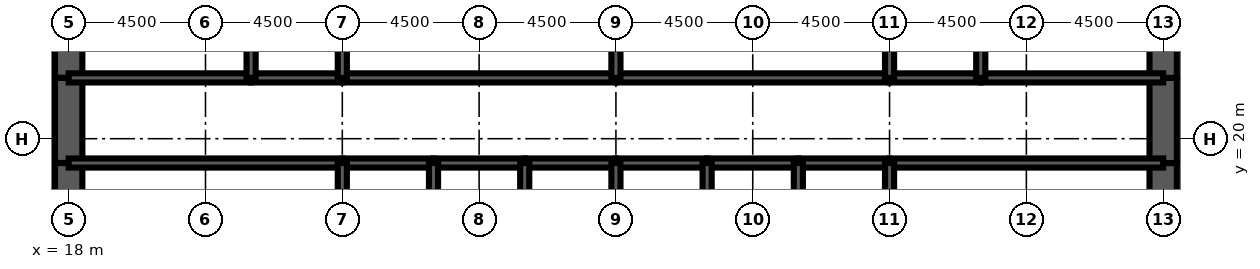
"""IFC4 building model, lengths in metres.
Left out: names, types, materials, properties, quantities, classifications, styles, units other than length and angle.
Written with IfcOpenShell. Run it as: python <this file> out.ifc"""

import sys

from ifc_helpers import new_model, si_unit, direction, frame, frame_2d, origin, place, context, subcontext, project, spatial, rectangle, extrude, element, fill, save


model = new_model("IFC4")
c1 = context("Model", 3, precision=1e-05, world=origin(), true_north=direction((0.0, 1.0)))
c2 = subcontext(c1, "Body", "Model", "MODEL_VIEW")
j1 = project(units=[si_unit("LENGTHUNIT", "METRE"), si_unit("PLANEANGLEUNIT", "RADIAN")], contexts=[c1])
p1 = place(None, origin())
s1 = spatial("IfcSite", under=j1, at=p1, CompositionType="ELEMENT")
p2 = place(p1, origin())
s2 = spatial("IfcBuilding", under=s1, at=p2, CompositionType="ELEMENT")
p3 = place(p2, frame((0.0, 0.0, 6.0)))
s3 = spatial("IfcBuildingStorey", under=s2, at=p3, CompositionType="ELEMENT", Elevation=6.0)
p4 = place(p3, frame((18.0, 26.0, 0.0), z_axis=(0.0, 0.0, 1.0), x_axis=(0.0, -1.0, 0.0)))
e1 = element("IfcWall", 1, at=p4, inside=s3, PredefinedType="SHEAR", context=c2, shape_type="SweptSolid", body=[
    extrude(rectangle(XDim=4.0, YDim=0.9, at=frame_2d((2.0, 0.0))), origin(), (0.0, 0.0, 1.0), 7.0),
])
p5 = place(p3, frame((18.0, 22.0, 0.0), z_axis=(0.0, 0.0, 1.0), x_axis=(0.0, -1.0, 0.0)))
e2 = element("IfcWall", 2, at=p5, inside=s3, PredefinedType="SHEAR", context=c2, shape_type="SweptSolid", body=[
    extrude(rectangle(XDim=2.8, YDim=0.9, at=frame_2d((1.4, 0.0))), origin(), (0.0, 0.0, 1.0), 7.0),
])
p6 = place(p5, frame((0.6, 0.0, 0.0)))
e3 = element("IfcOpeningElement", 3, at=p6, cuts=e2, PredefinedType="OPENING", context=c2, shape_type="SweptSolid", body=[
    extrude(rectangle(XDim=1.8, YDim=2.1, at=frame_2d((0.9, 1.05))), frame((0.0, 0.46, 0.0), z_axis=(0.0, -1.0, 0.0), x_axis=(1.0, 0.0, 0.0)), (0.0, 0.0, 1.0), 0.92),
])
for number, where, z_axis, x_axis in (
    (4, (18.0, 19.2, 0.0), (0.0, 0.0, 1.0), (0.0, -1.0, 0.0)),
    (5, (54.0, 16.0, 0.0), (0.0, 0.0, 1.0), (0.0, 1.0, 0.0)),
):
    element("IfcWall", number, at=place(p3, frame(where, z_axis=z_axis, x_axis=x_axis)), inside=s3, PredefinedType="SHEAR", context=c2, shape_type="SweptSolid", body=[
        extrude(rectangle(XDim=3.2, YDim=0.9, at=frame_2d((1.6, 0.0))), origin(), (0.0, 0.0, 1.0), 7.0),
    ])
p7 = place(p3, frame((54.0, 19.2, 0.0), z_axis=(0.0, 0.0, 1.0), x_axis=(0.0, 1.0, 0.0)))
e6 = element("IfcWall", 6, at=p7, inside=s3, PredefinedType="SHEAR", context=c2, shape_type="SweptSolid", body=[
    extrude(rectangle(XDim=2.8, YDim=0.9, at=frame_2d((1.4, 0.0))), origin(), (0.0, 0.0, 1.0), 7.0),
])
p8 = place(p7, frame((0.4, 0.0, 0.0)))
e7 = element("IfcOpeningElement", 7, at=p8, cuts=e6, PredefinedType="OPENING", context=c2, shape_type="SweptSolid", body=[
    extrude(rectangle(XDim=1.8, YDim=2.1, at=frame_2d((0.9, 1.05))), frame((0.0, 0.46, 0.0), z_axis=(0.0, -1.0, 0.0), x_axis=(1.0, 0.0, 0.0)), (0.0, 0.0, 1.0), 0.92),
])
p9 = place(p3, frame((54.0, 22.0, 0.0), z_axis=(0.0, 0.0, 1.0), x_axis=(0.0, 1.0, 0.0)))
e8 = element("IfcWall", 8, at=p9, inside=s3, PredefinedType="SHEAR", context=c2, shape_type="SweptSolid", body=[
    extrude(rectangle(XDim=4.0, YDim=0.9, at=frame_2d((2.0, 0.0))), origin(), (0.0, 0.0, 1.0), 7.0),
])
p10 = place(p3, frame((18.0, 19.2, 0.0), z_axis=(0.0, 0.0, 1.0), x_axis=(1.0, 0.0, 0.0)))
e9 = element("IfcWall", 9, at=p10, inside=s3, PredefinedType="SOLIDWALL", context=c2, shape_type="SweptSolid", body=[
    extrude(rectangle(XDim=9.0, YDim=0.3, at=frame_2d((4.5, 0.0))), origin(), (0.0, 0.0, 1.0), 7.0),
])
p11 = place(p10, frame((0.65, 0.0, 0.0)))
e10 = element("IfcOpeningElement", 10, at=p11, cuts=e9, PredefinedType="OPENING", context=c2, shape_type="SweptSolid", body=[
    extrude(rectangle(XDim=1.0, YDim=2.1, at=frame_2d((0.5, 1.05))), frame((0.0, 0.16, 0.0), z_axis=(0.0, -1.0, 0.0), x_axis=(1.0, 0.0, 0.0)), (0.0, 0.0, 1.0), 0.32),
])
p12 = place(p3, frame((27.0, 19.2, 0.0), z_axis=(0.0, 0.0, 1.0), x_axis=(1.0, 0.0, 0.0)))
e11 = element("IfcWall", 11, at=p12, inside=s3, PredefinedType="SOLIDWALL", context=c2, shape_type="SweptSolid", body=[
    extrude(rectangle(XDim=3.0, YDim=0.3, at=frame_2d((1.5, 0.0))), origin(), (0.0, 0.0, 1.0), 7.0),
])
p13 = place(p12, frame((0.95, 0.0, 0.0)))
e12 = element("IfcOpeningElement", 12, at=p13, cuts=e11, PredefinedType="OPENING", context=c2, shape_type="SweptSolid", body=[
    extrude(rectangle(XDim=1.1, YDim=2.2, at=frame_2d((0.55, 1.1))), frame((0.0, 0.16, 0.0), z_axis=(0.0, -1.0, 0.0), x_axis=(1.0, 0.0, 0.0)), (0.0, 0.0, 1.0), 0.32),
])
p14 = place(p3, frame((30.0, 19.2, 0.0), z_axis=(0.0, 0.0, 1.0), x_axis=(1.0, 0.0, 0.0)))
e13 = element("IfcWall", 13, at=p14, inside=s3, PredefinedType="SOLIDWALL", context=c2, shape_type="SweptSolid", body=[
    extrude(rectangle(XDim=3.0, YDim=0.3, at=frame_2d((1.5, 0.0))), origin(), (0.0, 0.0, 1.0), 7.0),
])
p15 = place(p14, frame((0.95, 0.0, 0.0)))
e14 = element("IfcOpeningElement", 14, at=p15, cuts=e13, PredefinedType="OPENING", context=c2, shape_type="SweptSolid", body=[
    extrude(rectangle(XDim=1.1, YDim=2.2, at=frame_2d((0.55, 1.1))), frame((0.0, 0.16, 0.0), z_axis=(0.0, -1.0, 0.0), x_axis=(1.0, 0.0, 0.0)), (0.0, 0.0, 1.0), 0.32),
])
p16 = place(p3, frame((33.0, 19.2, 0.0), z_axis=(0.0, 0.0, 1.0), x_axis=(1.0, 0.0, 0.0)))
e15 = element("IfcWall", 15, at=p16, inside=s3, PredefinedType="SOLIDWALL", context=c2, shape_type="SweptSolid", body=[
    extrude(rectangle(XDim=3.0, YDim=0.3, at=frame_2d((1.5, 0.0))), origin(), (0.0, 0.0, 1.0), 7.0),
])
p17 = place(p16, frame((0.95, 0.0, 0.0)))
e16 = element("IfcOpeningElement", 16, at=p17, cuts=e15, PredefinedType="OPENING", context=c2, shape_type="SweptSolid", body=[
    extrude(rectangle(XDim=1.1, YDim=2.2, at=frame_2d((0.55, 1.1))), frame((0.0, 0.16, 0.0), z_axis=(0.0, -1.0, 0.0), x_axis=(1.0, 0.0, 0.0)), (0.0, 0.0, 1.0), 0.32),
])
p18 = place(p3, frame((36.0, 19.2, 0.0), z_axis=(0.0, 0.0, 1.0), x_axis=(1.0, 0.0, 0.0)))
e17 = element("IfcWall", 17, at=p18, inside=s3, PredefinedType="SOLIDWALL", context=c2, shape_type="SweptSolid", body=[
    extrude(rectangle(XDim=3.0, YDim=0.3, at=frame_2d((1.5, 0.0))), origin(), (0.0, 0.0, 1.0), 7.0),
])
p19 = place(p18, frame((0.95, 0.0, 0.0)))
e18 = element("IfcOpeningElement", 18, at=p19, cuts=e17, PredefinedType="OPENING", context=c2, shape_type="SweptSolid", body=[
    extrude(rectangle(XDim=1.1, YDim=2.2, at=frame_2d((0.55, 1.1))), frame((0.0, 0.16, 0.0), z_axis=(0.0, -1.0, 0.0), x_axis=(1.0, 0.0, 0.0)), (0.0, 0.0, 1.0), 0.32),
])
for number, where, z_axis, x_axis in (
    (19, (39.0, 19.2, 0.0), (0.0, 0.0, 1.0), (1.0, 0.0, 0.0)),
    (20, (42.0, 19.2, 0.0), (0.0, 0.0, 1.0), (1.0, 0.0, 0.0)),
):
    element("IfcWall", number, at=place(p3, frame(where, z_axis=z_axis, x_axis=x_axis)), inside=s3, PredefinedType="SOLIDWALL", context=c2, shape_type="SweptSolid", body=[
        extrude(rectangle(XDim=3.0, YDim=0.3, at=frame_2d((1.5, 0.0))), origin(), (0.0, 0.0, 1.0), 7.0),
    ])
p20 = place(p3, frame((45.0, 19.2, 0.0), z_axis=(0.0, 0.0, 1.0), x_axis=(1.0, 0.0, 0.0)))
e21 = element("IfcWall", 21, at=p20, inside=s3, PredefinedType="SOLIDWALL", context=c2, shape_type="SweptSolid", body=[
    extrude(rectangle(XDim=9.0, YDim=0.3, at=frame_2d((4.5, 0.0))), origin(), (0.0, 0.0, 1.0), 7.0),
])
p21 = place(p20, frame((7.35, 0.0, 0.0)))
e22 = element("IfcOpeningElement", 22, at=p21, cuts=e21, PredefinedType="OPENING", context=c2, shape_type="SweptSolid", body=[
    extrude(rectangle(XDim=1.0, YDim=2.1, at=frame_2d((0.5, 1.05))), frame((0.0, 0.16, 0.0), z_axis=(0.0, -1.0, 0.0), x_axis=(1.0, 0.0, 0.0)), (0.0, 0.0, 1.0), 0.32),
])
p22 = place(p3, frame((18.0, 22.0, 0.0), z_axis=(0.0, 0.0, 1.0), x_axis=(1.0, 0.0, 0.0)))
e23 = element("IfcWall", 23, at=p22, inside=s3, PredefinedType="SOLIDWALL", context=c2, shape_type="SweptSolid", body=[
    extrude(rectangle(XDim=6.0, YDim=0.3, at=frame_2d((3.0, 0.0))), origin(), (0.0, 0.0, 1.0), 7.0),
])
p23 = place(p22, frame((4.4, 0.0, 0.0)))
e24 = element("IfcOpeningElement", 24, at=p23, cuts=e23, PredefinedType="OPENING", context=c2, shape_type="SweptSolid", body=[
    extrude(rectangle(XDim=1.0, YDim=2.1, at=frame_2d((0.5, 1.05))), frame((0.0, 0.16, 0.0), z_axis=(0.0, -1.0, 0.0), x_axis=(1.0, 0.0, 0.0)), (0.0, 0.0, 1.0), 0.32),
])
p24 = place(p22, frame((0.7, 0.0, 0.0)))
e25 = element("IfcOpeningElement", 25, at=p24, cuts=e23, PredefinedType="OPENING", context=c2, shape_type="SweptSolid", body=[
    extrude(rectangle(XDim=1.0, YDim=2.1, at=frame_2d((0.5, 1.05))), frame((0.0, 0.16, 0.0), z_axis=(0.0, -1.0, 0.0), x_axis=(1.0, 0.0, 0.0)), (0.0, 0.0, 1.0), 0.32),
])
p25 = place(p3, frame((24.0, 22.0, 0.0), z_axis=(0.0, 0.0, 1.0), x_axis=(1.0, 0.0, 0.0)))
e26 = element("IfcWall", 26, at=p25, inside=s3, PredefinedType="SOLIDWALL", context=c2, shape_type="SweptSolid", body=[
    extrude(rectangle(XDim=3.0, YDim=0.3, at=frame_2d((1.5, 0.0))), origin(), (0.0, 0.0, 1.0), 7.0),
])
p26 = place(p25, frame((1.0, 0.0, 0.0)))
e27 = element("IfcOpeningElement", 27, at=p26, cuts=e26, PredefinedType="OPENING", context=c2, shape_type="SweptSolid", body=[
    extrude(rectangle(XDim=1.0, YDim=2.1, at=frame_2d((0.5, 1.05))), frame((0.0, 0.16, 0.0), z_axis=(0.0, -1.0, 0.0), x_axis=(1.0, 0.0, 0.0)), (0.0, 0.0, 1.0), 0.32),
])
p27 = place(p3, frame((27.0, 22.0, 0.0), z_axis=(0.0, 0.0, 1.0), x_axis=(1.0, 0.0, 0.0)))
e28 = element("IfcWall", 28, at=p27, inside=s3, PredefinedType="SOLIDWALL", context=c2, shape_type="SweptSolid", body=[
    extrude(rectangle(XDim=9.0, YDim=0.3, at=frame_2d((4.5, 0.0))), origin(), (0.0, 0.0, 1.0), 7.0),
])
p28 = place(p27, frame((4.0, 0.0, 0.0)))
e29 = element("IfcOpeningElement", 29, at=p28, cuts=e28, PredefinedType="OPENING", context=c2, shape_type="SweptSolid", body=[
    extrude(rectangle(XDim=1.0, YDim=2.1, at=frame_2d((0.5, 1.05))), frame((0.0, 0.16, 0.0), z_axis=(0.0, -1.0, 0.0), x_axis=(1.0, 0.0, 0.0)), (0.0, 0.0, 1.0), 0.32),
])
p29 = place(p3, frame((36.0, 22.0, 0.0), z_axis=(0.0, 0.0, 1.0), x_axis=(1.0, 0.0, 0.0)))
e30 = element("IfcWall", 30, at=p29, inside=s3, PredefinedType="SOLIDWALL", context=c2, shape_type="SweptSolid", body=[
    extrude(rectangle(XDim=9.0, YDim=0.3, at=frame_2d((4.5, 0.0))), origin(), (0.0, 0.0, 1.0), 7.0),
])
p30 = place(p29, frame((4.0, 0.0, 0.0)))
e31 = element("IfcOpeningElement", 31, at=p30, cuts=e30, PredefinedType="OPENING", context=c2, shape_type="SweptSolid", body=[
    extrude(rectangle(XDim=1.0, YDim=2.1, at=frame_2d((0.5, 1.05))), frame((0.0, 0.16, 0.0), z_axis=(0.0, -1.0, 0.0), x_axis=(1.0, 0.0, 0.0)), (0.0, 0.0, 1.0), 0.32),
])
p31 = place(p3, frame((45.0, 22.0, 0.0), z_axis=(0.0, 0.0, 1.0), x_axis=(1.0, 0.0, 0.0)))
e32 = element("IfcWall", 32, at=p31, inside=s3, PredefinedType="SOLIDWALL", context=c2, shape_type="SweptSolid", body=[
    extrude(rectangle(XDim=3.0, YDim=0.3, at=frame_2d((1.5, 0.0))), origin(), (0.0, 0.0, 1.0), 7.0),
])
p32 = place(p31, frame((1.0, 0.0, 0.0)))
e33 = element("IfcOpeningElement", 33, at=p32, cuts=e32, PredefinedType="OPENING", context=c2, shape_type="SweptSolid", body=[
    extrude(rectangle(XDim=1.0, YDim=2.1, at=frame_2d((0.5, 1.05))), frame((0.0, 0.16, 0.0), z_axis=(0.0, -1.0, 0.0), x_axis=(1.0, 0.0, 0.0)), (0.0, 0.0, 1.0), 0.32),
])
p33 = place(p3, frame((48.0, 22.0, 0.0), z_axis=(0.0, 0.0, 1.0), x_axis=(1.0, 0.0, 0.0)))
e34 = element("IfcWall", 34, at=p33, inside=s3, PredefinedType="SOLIDWALL", context=c2, shape_type="SweptSolid", body=[
    extrude(rectangle(XDim=6.0, YDim=0.3, at=frame_2d((3.0, 0.0))), origin(), (0.0, 0.0, 1.0), 7.0),
])
p34 = place(p33, frame((2.0, 0.0, 0.0)))
e35 = element("IfcOpeningElement", 35, at=p34, cuts=e34, PredefinedType="OPENING", context=c2, shape_type="SweptSolid", body=[
    extrude(rectangle(XDim=1.0, YDim=2.1, at=frame_2d((0.5, 1.05))), frame((0.0, 0.16, 0.0), z_axis=(0.0, -1.0, 0.0), x_axis=(1.0, 0.0, 0.0)), (0.0, 0.0, 1.0), 0.32),
])
p35 = place(p33, frame((4.3, 0.0, 0.0)))
e36 = element("IfcOpeningElement", 36, at=p35, cuts=e34, PredefinedType="OPENING", context=c2, shape_type="SweptSolid", body=[
    extrude(rectangle(XDim=1.0, YDim=2.1, at=frame_2d((0.5, 1.05))), frame((0.0, 0.16, 0.0), z_axis=(0.0, -1.0, 0.0), x_axis=(1.0, 0.0, 0.0)), (0.0, 0.0, 1.0), 0.32),
])
for number, where, z_axis, x_axis in (
    (37, (27.0, 16.0, 0.0), (0.0, 0.0, 1.0), (0.0, 1.0, 0.0)),
    (38, (30.0, 16.0, 0.0), (0.0, 0.0, 1.0), (0.0, 1.0, 0.0)),
    (39, (33.0, 16.0, 0.0), (0.0, 0.0, 1.0), (0.0, 1.0, 0.0)),
    (40, (36.0, 16.0, 0.0), (0.0, 0.0, 1.0), (0.0, 1.0, 0.0)),
    (41, (39.0, 16.0, 0.0), (0.0, 0.0, 1.0), (0.0, 1.0, 0.0)),
    (42, (42.0, 16.0, 0.0), (0.0, 0.0, 1.0), (0.0, 1.0, 0.0)),
    (43, (45.0, 16.0, 0.0), (0.0, 0.0, 1.0), (0.0, 1.0, 0.0)),
):
    element("IfcWall", number, at=place(p3, frame(where, z_axis=z_axis, x_axis=x_axis)), inside=s3, PredefinedType="SOLIDWALL", context=c2, shape_type="SweptSolid", body=[
        extrude(rectangle(XDim=3.2, YDim=0.3, at=frame_2d((1.6, 0.0))), origin(), (0.0, 0.0, 1.0), 7.0),
    ])
for number, where, z_axis, x_axis in (
    (44, (24.0, 22.0, 0.0), (0.0, 0.0, 1.0), (0.0, 1.0, 0.0)),
    (45, (27.0, 22.0, 0.0), (0.0, 0.0, 1.0), (0.0, 1.0, 0.0)),
    (46, (36.0, 22.0, 0.0), (0.0, 0.0, 1.0), (0.0, 1.0, 0.0)),
    (47, (45.0, 22.0, 0.0), (0.0, 0.0, 1.0), (0.0, 1.0, 0.0)),
    (48, (48.0, 22.0, 0.0), (0.0, 0.0, 1.0), (0.0, 1.0, 0.0)),
):
    element("IfcWall", number, at=place(p3, frame(where, z_axis=z_axis, x_axis=x_axis)), inside=s3, PredefinedType="SOLIDWALL", context=c2, shape_type="SweptSolid", body=[
        extrude(rectangle(XDim=4.0, YDim=0.3, at=frame_2d((2.0, 0.0))), origin(), (0.0, 0.0, 1.0), 7.0),
    ])
p36 = place(p3, frame((38.5, 22.15, 0.0), z_axis=(0.0, 0.0, 1.0), x_axis=(0.0, 1.0, 0.0)))
e49 = element("IfcWall", 49, at=p36, inside=s3, PredefinedType="PARTITIONING", context=c2, shape_type="SweptSolid", body=[
    extrude(rectangle(XDim=3.7, YDim=0.15, at=frame_2d((1.85, 0.0))), origin(), (0.0, 0.0, 1.0), 3.0),
])
p37 = place(p36, frame((2.2, 0.0, 0.0)))
e50 = element("IfcOpeningElement", 50, at=p37, cuts=e49, PredefinedType="OPENING", context=c2, shape_type="SweptSolid", body=[
    extrude(rectangle(XDim=1.0, YDim=2.1, at=frame_2d((0.5, 1.05))), frame((0.0, 0.085, 0.0), z_axis=(0.0, -1.0, 0.0), x_axis=(1.0, 0.0, 0.0)), (0.0, 0.0, 1.0), 0.17),
])
for number, where, z_axis, x_axis in (
    (51, (20.025, 22.15, 0.0), (0.0, 0.0, 1.0), (0.0, 1.0, 0.0)),
    (52, (51.975, 22.15, 0.0), (0.0, 0.0, 1.0), (0.0, 1.0, 0.0)),
):
    element("IfcWall", number, at=place(p3, frame(where, z_axis=z_axis, x_axis=x_axis)), inside=s3, PredefinedType="PARTITIONING", context=c2, shape_type="SweptSolid", body=[
        extrude(rectangle(XDim=3.7, YDim=0.15, at=frame_2d((1.85, 0.0))), origin(), (0.0, 0.0, 1.0), 3.0),
    ])
p38 = place(p13, origin())
e53 = element("IfcDoor", 53, at=p38, inside=s3, OperationType="DOUBLE_DOOR_SLIDING", PredefinedType="USERDEFINED", context=c2, shape_type="SweptSolid", body=[
    extrude(rectangle(XDim=1.1, YDim=2.2, at=frame_2d((0.55, 1.1))), frame((0.0, 0.025, 0.0), z_axis=(0.0, -1.0, 0.0), x_axis=(1.0, 0.0, 0.0)), (0.0, 0.0, 1.0), 0.05),
])
fill(e12, e53)
p39 = place(p15, origin())
e54 = element("IfcDoor", 54, at=p39, inside=s3, OperationType="DOUBLE_DOOR_SLIDING", PredefinedType="USERDEFINED", context=c2, shape_type="SweptSolid", body=[
    extrude(rectangle(XDim=1.1, YDim=2.2, at=frame_2d((0.55, 1.1))), frame((0.0, 0.025, 0.0), z_axis=(0.0, -1.0, 0.0), x_axis=(1.0, 0.0, 0.0)), (0.0, 0.0, 1.0), 0.05),
])
fill(e14, e54)
p40 = place(p17, origin())
e55 = element("IfcDoor", 55, at=p40, inside=s3, OperationType="DOUBLE_DOOR_SLIDING", PredefinedType="USERDEFINED", context=c2, shape_type="SweptSolid", body=[
    extrude(rectangle(XDim=1.1, YDim=2.2, at=frame_2d((0.55, 1.1))), frame((0.0, 0.025, 0.0), z_axis=(0.0, -1.0, 0.0), x_axis=(1.0, 0.0, 0.0)), (0.0, 0.0, 1.0), 0.05),
])
fill(e16, e55)
p41 = place(p19, origin())
e56 = element("IfcDoor", 56, at=p41, inside=s3, OperationType="DOUBLE_DOOR_SLIDING", PredefinedType="USERDEFINED", context=c2, shape_type="SweptSolid", body=[
    extrude(rectangle(XDim=1.1, YDim=2.2, at=frame_2d((0.55, 1.1))), frame((0.0, 0.025, 0.0), z_axis=(0.0, -1.0, 0.0), x_axis=(1.0, 0.0, 0.0)), (0.0, 0.0, 1.0), 0.05),
])
fill(e18, e56)
p42 = place(p11, origin())
e57 = element("IfcDoor", 57, at=p42, inside=s3, OperationType="SINGLE_SWING_LEFT", PredefinedType="DOOR", context=c2, shape_type="SweptSolid", body=[
    extrude(rectangle(XDim=1.0, YDim=2.1, at=frame_2d((0.5, 1.05))), frame((0.0, 0.025, 0.0), z_axis=(0.0, -1.0, 0.0), x_axis=(1.0, 0.0, 0.0)), (0.0, 0.0, 1.0), 0.05),
])
fill(e10, e57)
p43 = place(p21, origin())
e58 = element("IfcDoor", 58, at=p43, inside=s3, OperationType="SINGLE_SWING_RIGHT", PredefinedType="DOOR", context=c2, shape_type="SweptSolid", body=[
    extrude(rectangle(XDim=1.0, YDim=2.1, at=frame_2d((0.5, 1.05))), frame((0.0, 0.025, 0.0), z_axis=(0.0, -1.0, 0.0), x_axis=(1.0, 0.0, 0.0)), (0.0, 0.0, 1.0), 0.05),
])
fill(e22, e58)
p44 = place(p6, origin())
e59 = element("IfcDoor", 59, at=p44, inside=s3, OperationType="SINGLE_SWING_LEFT", PredefinedType="DOOR", context=c2, shape_type="SweptSolid", body=[
    extrude(rectangle(XDim=1.8, YDim=2.1, at=frame_2d((0.9, 1.05))), frame((0.0, 0.45, 0.0), z_axis=(0.0, -1.0, 0.0), x_axis=(1.0, 0.0, 0.0)), (0.0, 0.0, 1.0), 0.899),
])
fill(e3, e59)
p45 = place(p8, origin())
e60 = element("IfcDoor", 60, at=p45, inside=s3, OperationType="SINGLE_SWING_LEFT", PredefinedType="DOOR", context=c2, shape_type="SweptSolid", body=[
    extrude(rectangle(XDim=1.8, YDim=2.1, at=frame_2d((0.9, 1.05))), frame((0.0, 0.45, 0.0), z_axis=(0.0, -1.0, 0.0), x_axis=(1.0, 0.0, 0.0)), (0.0, 0.0, 1.0), 0.899),
])
fill(e7, e60)
p46 = place(p23, origin())
e61 = element("IfcDoor", 61, at=p46, inside=s3, OperationType="SINGLE_SWING_RIGHT", PredefinedType="DOOR", context=c2, shape_type="SweptSolid", body=[
    extrude(rectangle(XDim=1.0, YDim=2.1, at=frame_2d((0.5, 1.05))), frame((0.0, 0.025, 0.0), z_axis=(0.0, -1.0, 0.0), x_axis=(1.0, 0.0, 0.0)), (0.0, 0.0, 1.0), 0.05),
])
fill(e24, e61)
p47 = place(p26, origin())
e62 = element("IfcDoor", 62, at=p47, inside=s3, OperationType="SINGLE_SWING_LEFT", PredefinedType="DOOR", context=c2, shape_type="SweptSolid", body=[
    extrude(rectangle(XDim=1.0, YDim=2.1, at=frame_2d((0.5, 1.05))), frame((0.0, 0.025, 0.0), z_axis=(0.0, -1.0, 0.0), x_axis=(1.0, 0.0, 0.0)), (0.0, 0.0, 1.0), 0.05),
])
fill(e27, e62)
p48 = place(p28, origin())
e63 = element("IfcDoor", 63, at=p48, inside=s3, OperationType="SINGLE_SWING_LEFT", PredefinedType="DOOR", context=c2, shape_type="SweptSolid", body=[
    extrude(rectangle(XDim=1.0, YDim=2.1, at=frame_2d((0.5, 1.05))), frame((0.0, 0.025, 0.0), z_axis=(0.0, -1.0, 0.0), x_axis=(1.0, 0.0, 0.0)), (0.0, 0.0, 1.0), 0.05),
])
fill(e29, e63)
p49 = place(p30, origin())
e64 = element("IfcDoor", 64, at=p49, inside=s3, OperationType="SINGLE_SWING_LEFT", PredefinedType="DOOR", context=c2, shape_type="SweptSolid", body=[
    extrude(rectangle(XDim=1.0, YDim=2.1, at=frame_2d((0.5, 1.05))), frame((0.0, 0.025, 0.0), z_axis=(0.0, -1.0, 0.0), x_axis=(1.0, 0.0, 0.0)), (0.0, 0.0, 1.0), 0.05),
])
fill(e31, e64)
p50 = place(p32, origin())
e65 = element("IfcDoor", 65, at=p50, inside=s3, OperationType="SINGLE_SWING_LEFT", PredefinedType="DOOR", context=c2, shape_type="SweptSolid", body=[
    extrude(rectangle(XDim=1.0, YDim=2.1, at=frame_2d((0.5, 1.05))), frame((0.0, 0.025, 0.0), z_axis=(0.0, -1.0, 0.0), x_axis=(1.0, 0.0, 0.0)), (0.0, 0.0, 1.0), 0.05),
])
fill(e33, e65)
p51 = place(p34, origin())
e66 = element("IfcDoor", 66, at=p51, inside=s3, OperationType="SINGLE_SWING_LEFT", PredefinedType="DOOR", context=c2, shape_type="SweptSolid", body=[
    extrude(rectangle(XDim=1.0, YDim=2.1, at=frame_2d((0.5, 1.05))), frame((0.0, 0.025, 0.0), z_axis=(0.0, -1.0, 0.0), x_axis=(1.0, 0.0, 0.0)), (0.0, 0.0, 1.0), 0.05),
])
fill(e35, e66)
p52 = place(p24, origin())
e67 = element("IfcDoor", 67, at=p52, inside=s3, OperationType="SINGLE_SWING_LEFT", PredefinedType="DOOR", context=c2, shape_type="SweptSolid", body=[
    extrude(rectangle(XDim=1.0, YDim=2.1, at=frame_2d((0.5, 1.05))), frame((0.0, 0.025, 0.0), z_axis=(0.0, -1.0, 0.0), x_axis=(1.0, 0.0, 0.0)), (0.0, 0.0, 1.0), 0.05),
])
fill(e25, e67)
p53 = place(p35, origin())
e68 = element("IfcDoor", 68, at=p53, inside=s3, OperationType="SINGLE_SWING_RIGHT", PredefinedType="DOOR", context=c2, shape_type="SweptSolid", body=[
    extrude(rectangle(XDim=1.0, YDim=2.1, at=frame_2d((0.5, 1.05))), frame((0.0, 0.025, 0.0), z_axis=(0.0, -1.0, 0.0), x_axis=(1.0, 0.0, 0.0)), (0.0, 0.0, 1.0), 0.05),
])
fill(e36, e68)
save(model, sys.argv[1])
